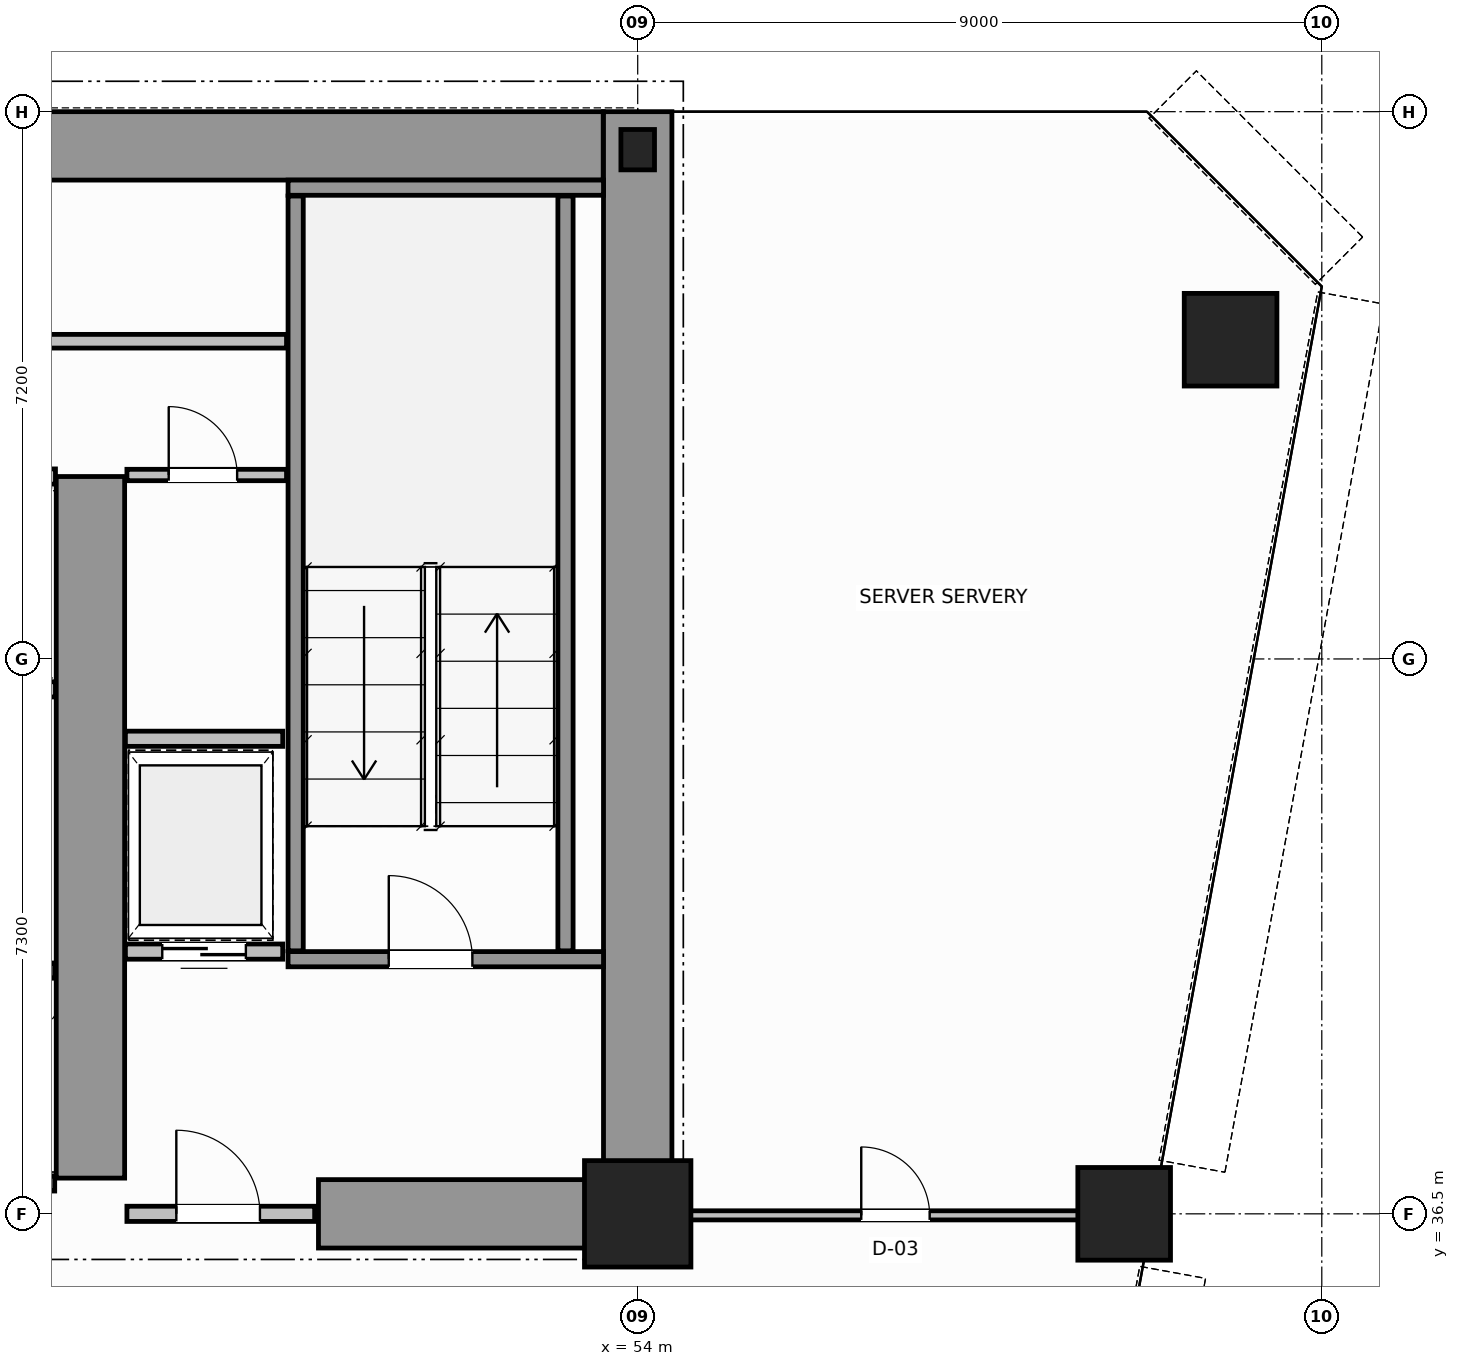
"""IFC4 building model, lengths in metres.
Left out: names, types, materials, properties, quantities, classifications, styles, units other than length and angle.
Written with IfcOpenShell. Run it as: python <this file> out.ifc"""

import sys

from ifc_helpers import new_model, si_unit, direction, frame, frame_2d, origin, origin_2d, place, context, subcontext, project, spatial, rectangle, hollow_circle, i_section, extrude, source, transform, mapped, element, fill, save


model = new_model("IFC4")
c1 = context("Model", 3, precision=1e-05, world=origin(), true_north=direction((0.0, 1.0)))
c2 = subcontext(c1, "Body", "Model", "MODEL_VIEW")
j1 = project(units=[si_unit("LENGTHUNIT", "METRE"), si_unit("PLANEANGLEUNIT", "RADIAN")], contexts=[c1])
p1 = place(None, origin())
s1 = spatial("IfcSite", under=j1, at=p1, CompositionType="ELEMENT")
p2 = place(p1, origin())
s2 = spatial("IfcBuilding", under=s1, at=p2, CompositionType="ELEMENT")
p3 = place(p2, frame((0.0, 0.0, 72.0)))
s3 = spatial("IfcBuildingStorey", under=s2, at=p3, CompositionType="ELEMENT", Elevation=72.0)
m1 = source(origin(), c2, "Body", "SweptSolid", [
    extrude(rectangle(XDim=1.4, YDim=1.4, at=origin_2d()), origin(), (0.0, 0.0, 1.0), 3.8),
])
p4 = place(p3, frame((54.0, 36.5, 0.0), z_axis=(0.0, 0.0, 1.0), x_axis=(1.0, 0.0, 0.0)))
e1 = element("IfcColumn", 1, at=p4, inside=s3, PredefinedType="COLUMN", context=c2, shape_type="MappedRepresentation", body=[
    mapped(m1, transform((0.0, 0.0, 0.0), scale=1.0)),
])
m2 = source(origin(), c2, "Body", "SweptSolid", [
    extrude(i_section(OverallWidth=0.442, OverallDepth=0.531, WebThickness=0.065, FlangeThickness=0.076, FilletRadius=0.015, at=origin_2d()), origin(), (0.0, 0.0, 1.0), 3.8),
])
p5 = place(p3, frame((54.0, 50.5, 0.0), z_axis=(0.0, 0.0, 1.0), x_axis=(1.0, 0.0, 0.0)))
e2 = element("IfcColumn", 2, at=p5, inside=s3, PredefinedType="COLUMN", context=c2, shape_type="MappedRepresentation", body=[
    mapped(m2, transform((0.0, 0.0, 0.0), scale=1.0)),
])
m3 = source(origin(), c2, "Body", "SweptSolid", [
    extrude(hollow_circle(Radius=0.61, WallThickness=0.05, at=origin_2d()), origin(), (0.0, 0.0, 1.0), 3.8),
])
for number, where, z_axis, x_axis in (
    (3, (61.8, 48.0, 0.0), (0.0, 0.0, 1.0), (1.0, 0.0, 0.0)),
    (4, (60.4, 36.5, 0.0), (0.0, 0.0, 1.0), (1.0, 0.0, 0.0)),
):
    element("IfcColumn", number, at=place(p3, frame(where, z_axis=z_axis, x_axis=x_axis)), inside=s3, PredefinedType="COLUMN", context=c2, shape_type="MappedRepresentation", body=[
        mapped(m3, transform((0.0, 0.0, 0.0), scale=1.0)),
    ])
p6 = place(p3, frame((34.002, 50.55, 0.0), z_axis=(0.0, 0.0, 1.0), x_axis=(1.0, 0.0, 0.0)))
e5 = element("IfcWall", 5, at=p6, inside=s3, PredefinedType="SHEAR", context=c2, shape_type="SweptSolid", body=[
    extrude(rectangle(XDim=19.544, YDim=0.9, at=frame_2d((9.772, 0.0))), origin(), (0.0, 0.0, 1.0), 3.8),
])
p7 = place(p3, frame((54.0, 36.5, 0.0), z_axis=(0.0, 0.0, 1.0), x_axis=(0.0, 1.0, 0.0)))
e6 = element("IfcWall", 6, at=p7, inside=s3, PredefinedType="SHEAR", context=c2, shape_type="SweptSolid", body=[
    extrude(rectangle(XDim=14.5, YDim=0.9, at=frame_2d((7.25, 0.0))), origin(), (0.0, 0.0, 1.0), 3.8),
])
p8 = place(p3, frame((49.8, 36.5, 0.0), z_axis=(0.0, 0.0, 1.0), x_axis=(1.0, 0.0, 0.0)))
e7 = element("IfcWall", 7, at=p8, inside=s3, PredefinedType="SHEAR", context=c2, shape_type="SweptSolid", body=[
    extrude(rectangle(XDim=3.73, YDim=0.9, at=frame_2d((1.865, 0.0))), origin(), (0.0, 0.0, 1.0), 2.38),
])
p9 = place(p3, frame((46.8, 36.97, 0.0), z_axis=(0.0, 0.0, 1.0), x_axis=(0.0, 1.0, 0.0)))
e8 = element("IfcWall", 8, at=p9, inside=s3, PredefinedType="SHEAR", context=c2, shape_type="SweptSolid", body=[
    extrude(rectangle(XDim=9.23, YDim=0.9, at=frame_2d((4.615, 0.0))), origin(), (0.0, 0.0, 1.0), 3.8),
])
p10 = place(p3, frame((49.4, 39.85, 0.0), z_axis=(0.0, 0.0, 1.0), x_axis=(1.0, 0.0, 0.0)))
e9 = element("IfcWall", 9, at=p10, inside=s3, PredefinedType="SOLIDWALL", context=c2, shape_type="SweptSolid", body=[
    extrude(rectangle(XDim=4.15, YDim=0.2, at=frame_2d((2.075, 0.0))), origin(), (0.0, 0.0, 1.0), 3.8),
])
p11 = place(p10, frame((1.325, 0.0, 0.0)))
e10 = element("IfcOpeningElement", 10, at=p11, cuts=e9, PredefinedType="OPENING", context=c2, shape_type="SweptSolid", body=[
    extrude(rectangle(XDim=1.1, YDim=2.15, at=frame_2d((0.55, 1.075))), frame((0.0, 0.11, 0.0), z_axis=(0.0, -1.0, 0.0), x_axis=(1.0, 0.0, 0.0)), (0.0, 0.0, 1.0), 0.22),
])
p12 = place(p3, frame((49.4, 50.0, 0.0), z_axis=(0.0, 0.0, 1.0), x_axis=(1.0, 0.0, 0.0)))
e11 = element("IfcWall", 11, at=p12, inside=s3, PredefinedType="SOLIDWALL", context=c2, shape_type="SweptSolid", body=[
    extrude(rectangle(XDim=4.15, YDim=0.2, at=frame_2d((2.075, 0.0))), origin(), (0.0, 0.0, 1.0), 3.8),
])
for number, where, z_axis, x_axis in (
    (12, (49.5, 39.96, 0.0), (0.0, 0.0, 1.0), (0.0, 1.0, 0.0)),
    (13, (53.05, 39.96, 0.0), (0.0, 0.0, 1.0), (0.0, 1.0, 0.0)),
):
    element("IfcWall", number, at=place(p3, frame(where, z_axis=z_axis, x_axis=x_axis)), inside=s3, PredefinedType="SOLIDWALL", context=c2, shape_type="SweptSolid", body=[
        extrude(rectangle(XDim=9.93, YDim=0.2, at=frame_2d((4.965, 0.0))), origin(), (0.0, 0.0, 1.0), 3.8),
    ])
p13 = place(p3, frame((47.28, 36.5, 0.0), z_axis=(0.0, 0.0, 1.0), x_axis=(1.0, 0.0, 0.0)))
e14 = element("IfcWall", 14, at=p13, inside=s3, PredefinedType="SOLIDWALL", context=c2, shape_type="SweptSolid", body=[
    extrude(rectangle(XDim=2.47, YDim=0.2, at=frame_2d((1.235, 0.0))), origin(), (0.0, 0.0, 1.0), 2.37),
])
p14 = place(p13, frame((0.65, 0.0, 0.0)))
e15 = element("IfcOpeningElement", 15, at=p14, cuts=e14, PredefinedType="OPENING", context=c2, shape_type="SweptSolid", body=[
    extrude(rectangle(XDim=1.1, YDim=2.15, at=frame_2d((0.55, 1.075))), frame((0.0, 0.11, 0.0), z_axis=(0.0, -1.0, 0.0), x_axis=(1.0, 0.0, 0.0)), (0.0, 0.0, 1.0), 0.22),
])
p15 = place(p3, frame((44.37, 39.7, 0.0), z_axis=(0.0, 0.0, 1.0), x_axis=(1.0, 0.0, 0.0)))
e16 = element("IfcWall", 16, at=p15, inside=s3, PredefinedType="SOLIDWALL", context=c2, shape_type="SweptSolid", body=[
    extrude(rectangle(XDim=1.96, YDim=0.2, at=frame_2d((0.98, 0.0))), origin(), (0.0, 0.0, 1.0), 3.58),
])
p16 = place(p3, frame((44.37, 36.9, 0.0), z_axis=(0.0, 0.0, 1.0), x_axis=(1.0, 0.0, 0.0)))
e17 = element("IfcWall", 17, at=p16, inside=s3, PredefinedType="SOLIDWALL", context=c2, shape_type="SweptSolid", body=[
    extrude(rectangle(XDim=1.96, YDim=0.2, at=frame_2d((0.98, 0.0))), origin(), (0.0, 0.0, 1.0), 2.37),
])
for number, where, z_axis, x_axis in (
    (18, (44.62, 43.4, 0.0), (0.0, 0.0, 1.0), (1.0, 0.0, 0.0)),
    (19, (44.62, 46.2, 0.0), (0.0, 0.0, 1.0), (1.0, 0.0, 0.0)),
):
    element("IfcWall", number, at=place(p3, frame(where, z_axis=z_axis, x_axis=x_axis)), inside=s3, PredefinedType="SOLIDWALL", context=c2, shape_type="SweptSolid", body=[
        extrude(rectangle(XDim=1.72, YDim=0.2, at=frame_2d((0.86, 0.0))), origin(), (0.0, 0.0, 1.0), 3.58),
    ])
p17 = place(p3, frame((47.26, 39.95, 0.0), z_axis=(0.0, 0.0, 1.0), x_axis=(1.0, 0.0, 0.0)))
e20 = element("IfcWall", 20, at=p17, inside=s3, PredefinedType="SOLIDWALL", context=c2, shape_type="SweptSolid", body=[
    extrude(rectangle(XDim=2.07, YDim=0.2, at=frame_2d((1.035, 0.0))), origin(), (0.0, 0.0, 1.0), 3.58),
])
p18 = place(p17, frame((0.485, 0.0, 0.0)))
e21 = element("IfcOpeningElement", 21, at=p18, cuts=e20, PredefinedType="OPENING", context=c2, shape_type="SweptSolid", body=[
    extrude(rectangle(XDim=1.1, YDim=2.15, at=frame_2d((0.55, 1.075))), frame((0.0, 0.11, 0.0), z_axis=(0.0, -1.0, 0.0), x_axis=(1.0, 0.0, 0.0)), (0.0, 0.0, 1.0), 0.22),
])
p19 = place(p3, frame((47.26, 42.75, 0.0), z_axis=(0.0, 0.0, 1.0), x_axis=(1.0, 0.0, 0.0)))
e22 = element("IfcWall", 22, at=p19, inside=s3, PredefinedType="SOLIDWALL", context=c2, shape_type="SweptSolid", body=[
    extrude(rectangle(XDim=2.07, YDim=0.2, at=frame_2d((1.035, 0.0))), origin(), (0.0, 0.0, 1.0), 3.58),
])
p20 = place(p3, frame((47.28, 46.22, 0.0), z_axis=(0.0, 0.0, 1.0), x_axis=(1.0, 0.0, 0.0)))
e23 = element("IfcWall", 23, at=p20, inside=s3, PredefinedType="PARTITIONING", context=c2, shape_type="SweptSolid", body=[
    extrude(rectangle(XDim=2.1, YDim=0.15, at=frame_2d((1.05, 0.0))), origin(), (0.0, 0.0, 1.0), 3.58),
])
p21 = place(p20, frame((0.55, 0.0, 0.0)))
e24 = element("IfcOpeningElement", 24, at=p21, cuts=e23, PredefinedType="OPENING", context=c2, shape_type="SweptSolid", body=[
    extrude(rectangle(XDim=0.9, YDim=2.1, at=frame_2d((0.45, 1.05))), frame((0.0, 0.085, 0.0), z_axis=(0.0, -1.0, 0.0), x_axis=(1.0, 0.0, 0.0)), (0.0, 0.0, 1.0), 0.17),
])
p22 = place(p3, frame((40.62, 47.98, 0.0), z_axis=(0.0, 0.0, 1.0), x_axis=(1.0, 0.0, 0.0)))
e25 = element("IfcWall", 25, at=p22, inside=s3, PredefinedType="PLUMBINGWALL", context=c2, shape_type="SweptSolid", body=[
    extrude(rectangle(XDim=8.76, YDim=0.18, at=frame_2d((4.38, 0.0))), origin(), (0.0, 0.0, 1.0), 3.58),
])
p23 = place(p22, frame((3.8, 0.0, 0.0)))
e26 = element("IfcOpeningElement", 26, at=p23, cuts=e25, PredefinedType="OPENING", context=c2, shape_type="SweptSolid", body=[
    extrude(rectangle(XDim=0.9, YDim=2.15, at=frame_2d((0.45, 1.075))), frame((0.0, 0.1, 0.0), z_axis=(0.0, -1.0, 0.0), x_axis=(1.0, 0.0, 0.0)), (0.0, 0.0, 1.0), 0.2),
])
p24 = place(p3, frame((54.06, 36.48, 0.0), z_axis=(0.0, 0.0, 1.0), x_axis=(1.0, 0.0, 0.0)))
e27 = element("IfcWall", 27, at=p24, inside=s3, PredefinedType="PARTITIONING", context=c2, shape_type="SweptSolid", body=[
    extrude(rectangle(XDim=6.663, YDim=0.12, at=frame_2d((3.332, 0.0))), origin(), (0.0, 0.0, 1.0), 2.77),
])
p25 = place(p24, frame((2.881, 0.0, 0.0)))
e28 = element("IfcOpeningElement", 28, at=p25, cuts=e27, PredefinedType="OPENING", context=c2, shape_type="SweptSolid", body=[
    extrude(rectangle(XDim=0.9, YDim=2.15, at=frame_2d((0.45, 1.075))), frame((0.0, 0.07, 0.0), z_axis=(0.0, -1.0, 0.0), x_axis=(1.0, 0.0, 0.0)), (0.0, 0.0, 1.0), 0.14),
])
m4 = source(origin(), c2, "Body", "SweptSolid", [
    extrude(rectangle(XDim=1.1, YDim=2.15, at=frame_2d((0.55, 1.075))), frame((0.0, 0.025, 0.0), z_axis=(0.0, -1.0, 0.0), x_axis=(1.0, 0.0, 0.0)), (0.0, 0.0, 1.0), 0.05),
])
p26 = place(p11, origin())
e29 = element("IfcDoor", 29, at=p26, inside=s3, OperationType="SINGLE_SWING_RIGHT", PredefinedType="DOOR", context=c2, shape_type="MappedRepresentation", body=[
    mapped(m4, transform((0.0, 0.0, 0.0), scale=1.0)),
])
fill(e10, e29)
p27 = place(p14, origin())
e30 = element("IfcDoor", 30, at=p27, inside=s3, OperationType="SINGLE_SWING_LEFT", PredefinedType="DOOR", context=c2, shape_type="MappedRepresentation", body=[
    mapped(m4, transform((0.0, 0.0, 0.0), scale=1.0)),
])
fill(e15, e30)
p28 = place(p18, origin())
e31 = element("IfcDoor", 31, at=p28, inside=s3, OperationType="DOUBLE_DOOR_SLIDING", PredefinedType="DOOR", context=c2, shape_type="MappedRepresentation", body=[
    mapped(m4, transform((0.0, 0.0, 0.0), scale=1.0)),
])
fill(e21, e31)
m5 = source(origin(), c2, "Body", "SweptSolid", [
    extrude(rectangle(XDim=0.9, YDim=2.1, at=frame_2d((0.45, 1.05))), frame((0.0, 0.025, 0.0), z_axis=(0.0, -1.0, 0.0), x_axis=(1.0, 0.0, 0.0)), (0.0, 0.0, 1.0), 0.05),
])
p29 = place(p21, origin())
e32 = element("IfcDoor", 32, at=p29, inside=s3, OperationType="SINGLE_SWING_RIGHT", PredefinedType="DOOR", context=c2, shape_type="MappedRepresentation", body=[
    mapped(m5, transform((0.0, 0.0, 0.0), scale=1.0)),
])
fill(e24, e32)
m6 = source(origin(), c2, "Body", "SweptSolid", [
    extrude(rectangle(XDim=0.9, YDim=2.15, at=frame_2d((0.45, 1.075))), frame((0.0, 0.025, 0.0), z_axis=(0.0, -1.0, 0.0), x_axis=(1.0, 0.0, 0.0)), (0.0, 0.0, 1.0), 0.05),
])
p30 = place(p25, origin())
e33 = element("IfcDoor", 33, at=p30, inside=s3, OperationType="SINGLE_SWING_RIGHT", PredefinedType="DOOR", context=c2, shape_type="MappedRepresentation", body=[
    mapped(m6, transform((0.0, 0.0, 0.0), scale=1.0)),
])
fill(e28, e33)
save(model, sys.argv[1])
